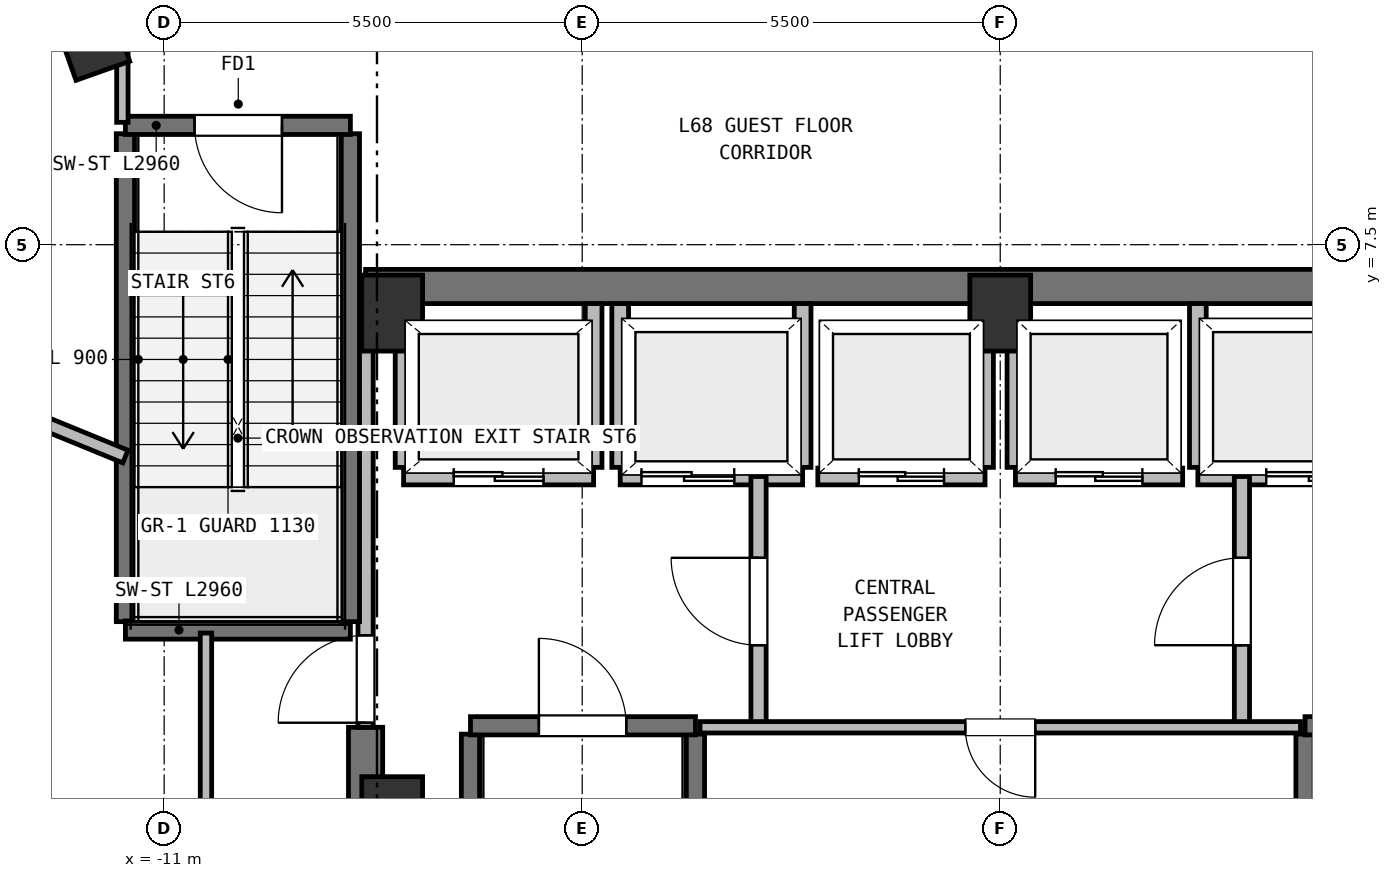
"""IFC4 building model, lengths in metres.
Left out: names, types, materials, properties, quantities, classifications, styles, units other than length and angle.
Written with IfcOpenShell. Run it as: python <this file> out.ifc"""

import sys

from ifc_helpers import new_model, si_unit, direction, frame, frame_2d, origin, origin_2d, place, context, subcontext, project, spatial, rectangle, extrude, element, fill, save


model = new_model("IFC4")
c1 = context("Model", 3, precision=1e-05, world=origin(), true_north=direction((0.0, 1.0)))
c2 = subcontext(c1, "Body", "Model", "MODEL_VIEW")
j1 = project(units=[si_unit("LENGTHUNIT", "METRE"), si_unit("PLANEANGLEUNIT", "RADIAN")], contexts=[c1])
p1 = place(None, origin())
s1 = spatial("IfcSite", under=j1, at=p1, CompositionType="ELEMENT")
p2 = place(p1, origin())
s2 = spatial("IfcBuilding", under=s1, at=p2, CompositionType="ELEMENT")
p3 = place(p2, frame((0.0, 0.0, 272.8)))
s3 = spatial("IfcBuildingStorey", under=s2, at=p3, CompositionType="ELEMENT", Elevation=272.8)
for number, where, z_axis, x_axis in (
    (1, (0.0, 6.6, 0.0), (0.0, 0.0, 1.0), (1.0, 0.0, 0.0)),
    (2, (-8.0, 6.6, 0.0), (0.0, 0.0, 1.0), (1.0, 0.0, 0.0)),
    (3, (-8.0, 0.0, 0.0), (0.0, 0.0, 1.0), (1.0, 0.0, 0.0)),
):
    element("IfcColumn", number, at=place(p3, frame(where, z_axis=z_axis, x_axis=x_axis)), inside=s3, PredefinedType="COLUMN", context=c2, shape_type="SweptSolid", body=[
        extrude(rectangle(XDim=0.8, YDim=1.0, at=origin_2d()), origin(), (0.0, 0.0, 1.0), 4.4),
    ])
p4 = place(p3, frame((-8.35, 6.95, 0.0), z_axis=(0.0, 0.0, 1.0), x_axis=(1.0, 0.0, 0.0)))
e4 = element("IfcWall", 4, at=p4, inside=s3, PredefinedType="SHEAR", context=c2, shape_type="SweptSolid", body=[
    extrude(rectangle(XDim=16.7, YDim=0.45, at=frame_2d((8.35, 0.0))), origin(), (0.0, 0.0, 1.0), 4.15),
])
p5 = place(p3, frame((-8.35, -6.95, 0.0), z_axis=(0.0, 0.0, 1.0), x_axis=(0.0, 1.0, 0.0)))
e5 = element("IfcWall", 5, at=p5, inside=s3, PredefinedType="SHEAR", context=c2, shape_type="SweptSolid", body=[
    extrude(rectangle(XDim=8.1, YDim=0.45, at=frame_2d((4.05, 0.0))), origin(), (0.0, 0.0, 1.0), 4.15),
])
p6 = place(p3, frame((-11.957, 10.212, 0.0), z_axis=(0.0, 0.0, 1.0), x_axis=(0.942641491092, 0.333806859234, 0.0)))
e6 = element("IfcColumn", 6, at=p6, inside=s3, PredefinedType="COLUMN", context=c2, shape_type="SweptSolid", body=[
    extrude(rectangle(XDim=0.75, YDim=0.9, at=origin_2d()), origin(), (0.0, 0.0, 1.0), 4.4),
])
p7 = place(p3, frame((-14.021, 9.694, 0.0), z_axis=(0.0, 0.0, 1.0), x_axis=(0.873970841772, 0.485978361383, 0.0)))
e7 = element("IfcWall", 7, at=p7, inside=s3, PredefinedType="SOLIDWALL", context=c2, shape_type="SweptSolid", body=[
    extrude(rectangle(XDim=2.472, YDim=0.33, at=frame_2d((1.236, 0.0))), origin(), (0.0, 0.0, 1.0), 4.15),
])
for number, where, z_axis, x_axis in (
    (8, (-6.97, -6.16, 0.0), (0.0, 0.0, 1.0), (0.0, 1.0, 0.0)),
    (9, (-4.01, -6.16, 0.0), (0.0, 0.0, 1.0), (0.0, 1.0, 0.0)),
):
    element("IfcWall", number, at=place(p3, frame(where, z_axis=z_axis, x_axis=x_axis)), inside=s3, PredefinedType="SHEAR", context=c2, shape_type="SweptSolid", body=[
        extrude(rectangle(XDim=7.22, YDim=0.24, at=frame_2d((3.61, 0.0))), origin(), (0.0, 0.0, 1.0), 4.15),
    ])
p8 = place(p3, frame((-6.97, 1.17, 0.0), z_axis=(0.0, 0.0, 1.0), x_axis=(1.0, 0.0, 0.0)))
e10 = element("IfcWall", 10, at=p8, inside=s3, PredefinedType="SHEAR", context=c2, shape_type="SweptSolid", body=[
    extrude(rectangle(XDim=2.96, YDim=0.24, at=frame_2d((1.48, 0.0))), origin(), (0.0, 0.0, 1.0), 4.15),
])
p9 = place(p8, frame((0.9, 0.0, 0.0)))
e11 = element("IfcOpeningElement", 11, at=p9, cuts=e10, PredefinedType="OPENING", context=c2, shape_type="SweptSolid", body=[
    extrude(rectangle(XDim=1.15, YDim=2.15, at=frame_2d((0.575, 1.075))), frame((0.0, 0.13, 0.0), z_axis=(0.0, -1.0, 0.0), x_axis=(1.0, 0.0, 0.0)), (0.0, 0.0, 1.0), 0.26),
])
p10 = place(p3, frame((4.01, -6.16, 0.0), z_axis=(0.0, 0.0, 1.0), x_axis=(0.0, 1.0, 0.0)))
e12 = element("IfcWall", 12, at=p10, inside=s3, PredefinedType="SHEAR", context=c2, shape_type="SweptSolid", body=[
    extrude(rectangle(XDim=7.22, YDim=0.24, at=frame_2d((3.61, 0.0))), origin(), (0.0, 0.0, 1.0), 4.15),
])
p11 = place(p3, frame((4.01, 1.17, 0.0), z_axis=(0.0, 0.0, 1.0), x_axis=(1.0, 0.0, 0.0)))
e13 = element("IfcWall", 13, at=p11, inside=s3, PredefinedType="SHEAR", context=c2, shape_type="SweptSolid", body=[
    extrude(rectangle(XDim=2.96, YDim=0.24, at=frame_2d((1.48, 0.0))), origin(), (0.0, 0.0, 1.0), 4.15),
])
p12 = place(p11, frame((0.9, 0.0, 0.0)))
e14 = element("IfcOpeningElement", 14, at=p12, cuts=e13, PredefinedType="OPENING", context=c2, shape_type="SweptSolid", body=[
    extrude(rectangle(XDim=1.15, YDim=2.15, at=frame_2d((0.575, 1.075))), frame((0.0, 0.13, 0.0), z_axis=(0.0, -1.0, 0.0), x_axis=(1.0, 0.0, 0.0)), (0.0, 0.0, 1.0), 0.26),
])
p13 = place(p3, frame((-7.85, 4.45, 0.0), z_axis=(0.0, 0.0, 1.0), x_axis=(1.0, 0.0, 0.0)))
e15 = element("IfcWall", 15, at=p13, inside=s3, PredefinedType="PARTITIONING", context=c2, shape_type="SweptSolid", body=[
    extrude(rectangle(XDim=2.5, YDim=0.22, at=frame_2d((1.25, 0.0))), origin(), (0.0, 0.0, 1.0), 4.15),
])
p14 = place(p13, frame((0.66, 0.0, 0.0)))
e16 = element("IfcOpeningElement", 16, at=p14, cuts=e15, PredefinedType="OPENING", context=c2, shape_type="SweptSolid", body=[
    extrude(rectangle(XDim=1.18, YDim=2.15, at=frame_2d((0.59, 1.075))), frame((0.0, 0.12, 0.0), z_axis=(0.0, -1.0, 0.0), x_axis=(1.0, 0.0, 0.0)), (0.0, 0.0, 1.0), 0.24),
])
p15 = place(p3, frame((-7.85, 4.57, 0.0), z_axis=(0.0, 0.0, 1.0), x_axis=(0.0, 1.0, 0.0)))
e17 = element("IfcWall", 17, at=p15, inside=s3, PredefinedType="PARTITIONING", context=c2, shape_type="SweptSolid", body=[
    extrude(rectangle(XDim=2.155, YDim=0.22, at=frame_2d((1.078, 0.0))), origin(), (0.0, 0.0, 1.0), 3.83),
])
p16 = place(p3, frame((-5.35, 4.57, 0.0), z_axis=(0.0, 0.0, 1.0), x_axis=(0.0, 1.0, 0.0)))
e18 = element("IfcWall", 18, at=p16, inside=s3, PredefinedType="PARTITIONING", context=c2, shape_type="SweptSolid", body=[
    extrude(rectangle(XDim=2.155, YDim=0.22, at=frame_2d((1.078, 0.0))), origin(), (0.0, 0.0, 1.0), 4.15),
])
p17 = place(p3, frame((-5.0, 4.45, 0.0), z_axis=(0.0, 0.0, 1.0), x_axis=(1.0, 0.0, 0.0)))
e19 = element("IfcWall", 19, at=p17, inside=s3, PredefinedType="PARTITIONING", context=c2, shape_type="SweptSolid", body=[
    extrude(rectangle(XDim=2.4, YDim=0.22, at=frame_2d((1.2, 0.0))), origin(), (0.0, 0.0, 1.0), 4.15),
])
p18 = place(p17, frame((0.28, 0.0, 0.0)))
e20 = element("IfcOpeningElement", 20, at=p18, cuts=e19, PredefinedType="OPENING", context=c2, shape_type="SweptSolid", body=[
    extrude(rectangle(XDim=1.22, YDim=2.15, at=frame_2d((0.61, 1.075))), frame((0.0, 0.12, 0.0), z_axis=(0.0, -1.0, 0.0), x_axis=(1.0, 0.0, 0.0)), (0.0, 0.0, 1.0), 0.24),
])
for number, where, z_axis, x_axis in (
    (21, (-5.0, 4.57, 0.0), (0.0, 0.0, 1.0), (0.0, 1.0, 0.0)),
    (22, (-2.6, 4.57, 0.0), (0.0, 0.0, 1.0), (0.0, 1.0, 0.0)),
):
    element("IfcWall", number, at=place(p3, frame(where, z_axis=z_axis, x_axis=x_axis)), inside=s3, PredefinedType="PARTITIONING", context=c2, shape_type="SweptSolid", body=[
        extrude(rectangle(XDim=2.155, YDim=0.22, at=frame_2d((1.078, 0.0))), origin(), (0.0, 0.0, 1.0), 4.15),
    ])
p19 = place(p3, frame((2.6, 4.45, 0.0), z_axis=(0.0, 0.0, 1.0), x_axis=(1.0, 0.0, 0.0)))
e23 = element("IfcWall", 23, at=p19, inside=s3, PredefinedType="PARTITIONING", context=c2, shape_type="SweptSolid", body=[
    extrude(rectangle(XDim=2.4, YDim=0.22, at=frame_2d((1.2, 0.0))), origin(), (0.0, 0.0, 1.0), 4.15),
])
p20 = place(p19, frame((0.9, 0.0, 0.0)))
e24 = element("IfcOpeningElement", 24, at=p20, cuts=e23, PredefinedType="OPENING", context=c2, shape_type="SweptSolid", body=[
    extrude(rectangle(XDim=1.22, YDim=2.15, at=frame_2d((0.61, 1.075))), frame((0.0, 0.12, 0.0), z_axis=(0.0, -1.0, 0.0), x_axis=(1.0, 0.0, 0.0)), (0.0, 0.0, 1.0), 0.24),
])
p21 = place(p3, frame((2.6, 4.57, 0.0), z_axis=(0.0, 0.0, 1.0), x_axis=(0.0, 1.0, 0.0)))
e25 = element("IfcWall", 25, at=p21, inside=s3, PredefinedType="PARTITIONING", context=c2, shape_type="SweptSolid", body=[
    extrude(rectangle(XDim=2.155, YDim=0.22, at=frame_2d((1.078, 0.0))), origin(), (0.0, 0.0, 1.0), 4.15),
])
p22 = place(p3, frame((-2.4, 4.45, 0.0), z_axis=(0.0, 0.0, 1.0), x_axis=(1.0, 0.0, 0.0)))
e26 = element("IfcWall", 26, at=p22, inside=s3, PredefinedType="PARTITIONING", context=c2, shape_type="SweptSolid", body=[
    extrude(rectangle(XDim=2.2, YDim=0.22, at=frame_2d((1.1, 0.0))), origin(), (0.0, 0.0, 1.0), 4.15),
])
p23 = place(p22, frame((0.54, 0.0, 0.0)))
e27 = element("IfcOpeningElement", 27, at=p23, cuts=e26, PredefinedType="OPENING", context=c2, shape_type="SweptSolid", body=[
    extrude(rectangle(XDim=1.12, YDim=2.15, at=frame_2d((0.56, 1.075))), frame((0.0, 0.12, 0.0), z_axis=(0.0, -1.0, 0.0), x_axis=(1.0, 0.0, 0.0)), (0.0, 0.0, 1.0), 0.24),
])
p24 = place(p3, frame((-0.2, 4.57, 0.0), z_axis=(0.0, 0.0, 1.0), x_axis=(0.0, 1.0, 0.0)))
e28 = element("IfcWall", 28, at=p24, inside=s3, PredefinedType="PARTITIONING", context=c2, shape_type="SweptSolid", body=[
    extrude(rectangle(XDim=2.155, YDim=0.22, at=frame_2d((1.078, 0.0))), origin(), (0.0, 0.0, 1.0), 4.15),
])
p25 = place(p3, frame((0.2, 4.45, 0.0), z_axis=(0.0, 0.0, 1.0), x_axis=(1.0, 0.0, 0.0)))
e29 = element("IfcWall", 29, at=p25, inside=s3, PredefinedType="PARTITIONING", context=c2, shape_type="SweptSolid", body=[
    extrude(rectangle(XDim=2.2, YDim=0.22, at=frame_2d((1.1, 0.0))), origin(), (0.0, 0.0, 1.0), 4.15),
])
p26 = place(p25, frame((0.53, 0.0, 0.0)))
e30 = element("IfcOpeningElement", 30, at=p26, cuts=e29, PredefinedType="OPENING", context=c2, shape_type="SweptSolid", body=[
    extrude(rectangle(XDim=1.14, YDim=2.15, at=frame_2d((0.57, 1.075))), frame((0.0, 0.12, 0.0), z_axis=(0.0, -1.0, 0.0), x_axis=(1.0, 0.0, 0.0)), (0.0, 0.0, 1.0), 0.24),
])
p27 = place(p3, frame((0.2, 4.57, 0.0), z_axis=(0.0, 0.0, 1.0), x_axis=(0.0, 1.0, 0.0)))
e31 = element("IfcWall", 31, at=p27, inside=s3, PredefinedType="PARTITIONING", context=c2, shape_type="SweptSolid", body=[
    extrude(rectangle(XDim=2.155, YDim=0.22, at=frame_2d((1.078, 0.0))), origin(), (0.0, 0.0, 1.0), 4.15),
])
p28 = place(p3, frame((-3.18, 1.15, 0.0), z_axis=(0.0, 0.0, 1.0), x_axis=(0.0, 1.0, 0.0)))
e32 = element("IfcWall", 32, at=p28, inside=s3, PredefinedType="PARTITIONING", context=c2, shape_type="SweptSolid", body=[
    extrude(rectangle(XDim=3.3, YDim=0.2, at=frame_2d((1.65, 0.0))), origin(), (0.0, 0.0, 1.0), 4.15),
])
p29 = place(p28, frame((1.08, 0.0, 0.0)))
e33 = element("IfcOpeningElement", 33, at=p29, cuts=e32, PredefinedType="OPENING", context=c2, shape_type="SweptSolid", body=[
    extrude(rectangle(XDim=1.15, YDim=2.15, at=frame_2d((0.575, 1.075))), frame((0.0, 0.11, 0.0), z_axis=(0.0, -1.0, 0.0), x_axis=(1.0, 0.0, 0.0)), (0.0, 0.0, 1.0), 0.22),
])
p30 = place(p3, frame((3.18, 1.15, 0.0), z_axis=(0.0, 0.0, 1.0), x_axis=(0.0, 1.0, 0.0)))
e34 = element("IfcWall", 34, at=p30, inside=s3, PredefinedType="PARTITIONING", context=c2, shape_type="SweptSolid", body=[
    extrude(rectangle(XDim=3.3, YDim=0.2, at=frame_2d((1.65, 0.0))), origin(), (0.0, 0.0, 1.0), 4.15),
])
p31 = place(p30, frame((1.08, 0.0, 0.0)))
e35 = element("IfcOpeningElement", 35, at=p31, cuts=e34, PredefinedType="OPENING", context=c2, shape_type="SweptSolid", body=[
    extrude(rectangle(XDim=1.15, YDim=2.15, at=frame_2d((0.575, 1.075))), frame((0.0, 0.11, 0.0), z_axis=(0.0, -1.0, 0.0), x_axis=(1.0, 0.0, 0.0)), (0.0, 0.0, 1.0), 0.22),
])
p32 = place(p3, frame((-8.35, 1.15, 0.0), z_axis=(0.0, 0.0, 1.0), x_axis=(0.0, 1.0, 0.0)))
e36 = element("IfcWall", 36, at=p32, inside=s3, PredefinedType="PARTITIONING", context=c2, shape_type="SweptSolid", body=[
    extrude(rectangle(XDim=5.4, YDim=0.2, at=frame_2d((2.7, 0.0))), origin(), (0.0, 0.0, 1.0), 4.15),
])
p33 = place(p32, frame((0.06, 0.0, 0.0)))
e37 = element("IfcOpeningElement", 37, at=p33, cuts=e36, PredefinedType="OPENING", context=c2, shape_type="SweptSolid", body=[
    extrude(rectangle(XDim=1.15, YDim=2.15, at=frame_2d((0.575, 1.075))), frame((0.0, 0.11, 0.0), z_axis=(0.0, -1.0, 0.0), x_axis=(1.0, 0.0, 0.0)), (0.0, 0.0, 1.0), 0.22),
])
p34 = place(p3, frame((3.95, 1.15, 0.0), z_axis=(0.0, 0.0, 1.0), x_axis=(-1.0, 0.0, 0.0)))
e38 = element("IfcWall", 38, at=p34, inside=s3, PredefinedType="PARTITIONING", context=c2, shape_type="SweptSolid", body=[
    extrude(rectangle(XDim=7.9, YDim=0.15, at=frame_2d((3.95, 0.0))), origin(), (0.0, 0.0, 1.0), 4.15),
])
p35 = place(p34, frame((3.49, 0.0, 0.0)))
e39 = element("IfcOpeningElement", 39, at=p35, cuts=e38, PredefinedType="OPENING", context=c2, shape_type="SweptSolid", body=[
    extrude(rectangle(XDim=0.92, YDim=2.05, at=frame_2d((0.46, 1.025))), frame((0.0, 0.085, 0.0), z_axis=(0.0, -1.0, 0.0), x_axis=(1.0, 0.0, 0.0)), (0.0, 0.0, 1.0), 0.17),
])
p36 = place(p3, frame((-11.51, 2.54, 0.0), z_axis=(0.0, 0.0, 1.0), x_axis=(0.0, 1.0, 0.0)))
e40 = element("IfcWall", 40, at=p36, inside=s3, PredefinedType="SHEAR", context=c2, shape_type="SweptSolid", body=[
    extrude(rectangle(XDim=6.42, YDim=0.24, at=frame_2d((3.21, 0.0))), origin(), (0.0, 0.0, 1.0), 4.15),
])
p37 = place(p3, frame((-11.51, 2.43, 0.0), z_axis=(0.0, 0.0, 1.0), x_axis=(1.0, 0.0, 0.0)))
e41 = element("IfcWall", 41, at=p37, inside=s3, PredefinedType="SHEAR", context=c2, shape_type="SweptSolid", body=[
    extrude(rectangle(XDim=2.96, YDim=0.24, at=frame_2d((1.48, 0.0))), origin(), (0.0, 0.0, 1.0), 4.15),
])
p38 = place(p3, frame((-8.55, 2.54, 0.0), z_axis=(0.0, 0.0, 1.0), x_axis=(0.0, 1.0, 0.0)))
e42 = element("IfcWall", 42, at=p38, inside=s3, PredefinedType="SHEAR", context=c2, shape_type="SweptSolid", body=[
    extrude(rectangle(XDim=6.42, YDim=0.24, at=frame_2d((3.21, 0.0))), origin(), (0.0, 0.0, 1.0), 4.15),
])
p39 = place(p3, frame((-8.55, 9.07, 0.0), z_axis=(0.0, 0.0, 1.0), x_axis=(-1.0, 0.0, 0.0)))
e43 = element("IfcWall", 43, at=p39, inside=s3, PredefinedType="SHEAR", context=c2, shape_type="SweptSolid", body=[
    extrude(rectangle(XDim=2.96, YDim=0.24, at=frame_2d((1.48, 0.0))), origin(), (0.0, 0.0, 1.0), 4.15),
])
p40 = place(p39, frame((0.9, 0.0, 0.0)))
e44 = element("IfcOpeningElement", 44, at=p40, cuts=e43, PredefinedType="OPENING", context=c2, shape_type="SweptSolid", body=[
    extrude(rectangle(XDim=1.15, YDim=2.15, at=frame_2d((0.575, 1.075))), frame((0.0, 0.13, 0.0), z_axis=(0.0, -1.0, 0.0), x_axis=(1.0, 0.0, 0.0)), (0.0, 0.0, 1.0), 0.26),
])
p41 = place(p3, frame((-11.55, 9.11, 0.0), z_axis=(0.0, 0.0, 1.0), x_axis=(0.0, 1.0, 0.0)))
e45 = element("IfcWall", 45, at=p41, inside=s3, PredefinedType="PARTITIONING", context=c2, shape_type="SweptSolid", body=[
    extrude(rectangle(XDim=1.37, YDim=0.15, at=frame_2d((0.685, 0.0))), origin(), (0.0, 0.0, 1.0), 4.15),
])
p42 = place(p3, frame((-10.45, -7.24, 0.0), z_axis=(0.0, 0.0, 1.0), x_axis=(0.0, 1.0, 0.0)))
e46 = element("IfcWall", 46, at=p42, inside=s3, PredefinedType="PARTITIONING", context=c2, shape_type="SweptSolid", body=[
    extrude(rectangle(XDim=9.63, YDim=0.15, at=frame_2d((4.815, 0.0))), origin(), (0.0, 0.0, 1.0), 4.15),
])
p43 = place(p42, frame((4.355, 0.0, 0.0)))
e47 = element("IfcOpeningElement", 47, at=p43, cuts=e46, PredefinedType="OPENING", context=c2, shape_type="SweptSolid", body=[
    extrude(rectangle(XDim=1.0, YDim=2.15, at=frame_2d((0.5, 1.075))), frame((0.0, 0.085, 0.0), z_axis=(0.0, -1.0, 0.0), x_axis=(1.0, 0.0, 0.0)), (0.0, 0.0, 1.0), 0.17),
])
p44 = place(p3, frame((-11.51, 4.712, 0.0), z_axis=(0.0, 0.0, 1.0), x_axis=(-0.925422915291, 0.378935915234, 0.0)))
e48 = element("IfcWall", 48, at=p44, inside=s3, PredefinedType="PARTITIONING", context=c2, shape_type="SweptSolid", body=[
    extrude(rectangle(XDim=6.806, YDim=0.18, at=frame_2d((3.403, 0.0))), origin(), (0.0, 0.0, 1.0), 4.15),
])
p45 = place(p9, origin())
e49 = element("IfcDoor", 49, at=p45, inside=s3, OperationType="SINGLE_SWING_LEFT", PredefinedType="DOOR", context=c2, shape_type="SweptSolid", body=[
    extrude(rectangle(XDim=1.15, YDim=2.15, at=frame_2d((0.575, 1.075))), frame((0.0, 0.025, 0.0), z_axis=(0.0, -1.0, 0.0), x_axis=(1.0, 0.0, 0.0)), (0.0, 0.0, 1.0), 0.05),
])
fill(e11, e49)
p46 = place(p14, origin())
e50 = element("IfcDoor", 50, at=p46, inside=s3, OperationType="DOUBLE_DOOR_SLIDING", PredefinedType="DOOR", context=c2, shape_type="SweptSolid", body=[
    extrude(rectangle(XDim=1.18, YDim=2.15, at=frame_2d((0.59, 1.075))), frame((0.0, 0.025, 0.0), z_axis=(0.0, -1.0, 0.0), x_axis=(1.0, 0.0, 0.0)), (0.0, 0.0, 1.0), 0.05),
])
fill(e16, e50)
p47 = place(p18, origin())
e51 = element("IfcDoor", 51, at=p47, inside=s3, OperationType="DOUBLE_DOOR_SLIDING", PredefinedType="DOOR", context=c2, shape_type="SweptSolid", body=[
    extrude(rectangle(XDim=1.22, YDim=2.15, at=frame_2d((0.61, 1.075))), frame((0.0, 0.025, 0.0), z_axis=(0.0, -1.0, 0.0), x_axis=(1.0, 0.0, 0.0)), (0.0, 0.0, 1.0), 0.05),
])
fill(e20, e51)
p48 = place(p20, origin())
e52 = element("IfcDoor", 52, at=p48, inside=s3, OperationType="DOUBLE_DOOR_SLIDING", PredefinedType="DOOR", context=c2, shape_type="SweptSolid", body=[
    extrude(rectangle(XDim=1.22, YDim=2.15, at=frame_2d((0.61, 1.075))), frame((0.0, 0.025, 0.0), z_axis=(0.0, -1.0, 0.0), x_axis=(1.0, 0.0, 0.0)), (0.0, 0.0, 1.0), 0.05),
])
fill(e24, e52)
p49 = place(p23, origin())
e53 = element("IfcDoor", 53, at=p49, inside=s3, OperationType="DOUBLE_DOOR_SLIDING", PredefinedType="DOOR", context=c2, shape_type="SweptSolid", body=[
    extrude(rectangle(XDim=1.12, YDim=2.15, at=frame_2d((0.56, 1.075))), frame((0.0, 0.025, 0.0), z_axis=(0.0, -1.0, 0.0), x_axis=(1.0, 0.0, 0.0)), (0.0, 0.0, 1.0), 0.05),
])
fill(e27, e53)
p50 = place(p26, origin())
e54 = element("IfcDoor", 54, at=p50, inside=s3, OperationType="DOUBLE_DOOR_SLIDING", PredefinedType="DOOR", context=c2, shape_type="SweptSolid", body=[
    extrude(rectangle(XDim=1.14, YDim=2.15, at=frame_2d((0.57, 1.075))), frame((0.0, 0.025, 0.0), z_axis=(0.0, -1.0, 0.0), x_axis=(1.0, 0.0, 0.0)), (0.0, 0.0, 1.0), 0.05),
])
fill(e30, e54)
p51 = place(p29, origin())
e55 = element("IfcDoor", 55, at=p51, inside=s3, OperationType="SINGLE_SWING_RIGHT", PredefinedType="DOOR", context=c2, shape_type="SweptSolid", body=[
    extrude(rectangle(XDim=1.15, YDim=2.15, at=frame_2d((0.575, 1.075))), frame((0.0, 0.025, 0.0), z_axis=(0.0, -1.0, 0.0), x_axis=(1.0, 0.0, 0.0)), (0.0, 0.0, 1.0), 0.05),
])
fill(e33, e55)
p52 = place(p31, origin())
e56 = element("IfcDoor", 56, at=p52, inside=s3, OperationType="SINGLE_SWING_LEFT", PredefinedType="DOOR", context=c2, shape_type="SweptSolid", body=[
    extrude(rectangle(XDim=1.15, YDim=2.15, at=frame_2d((0.575, 1.075))), frame((0.0, 0.025, 0.0), z_axis=(0.0, -1.0, 0.0), x_axis=(1.0, 0.0, 0.0)), (0.0, 0.0, 1.0), 0.05),
])
fill(e35, e56)
p53 = place(p33, origin())
e57 = element("IfcDoor", 57, at=p53, inside=s3, OperationType="SINGLE_SWING_LEFT", PredefinedType="DOOR", context=c2, shape_type="SweptSolid", body=[
    extrude(rectangle(XDim=1.15, YDim=2.15, at=frame_2d((0.575, 1.075))), frame((0.0, 0.025, 0.0), z_axis=(0.0, -1.0, 0.0), x_axis=(1.0, 0.0, 0.0)), (0.0, 0.0, 1.0), 0.05),
])
fill(e37, e57)
p54 = place(p35, origin())
e58 = element("IfcDoor", 58, at=p54, inside=s3, OperationType="SINGLE_SWING_LEFT", PredefinedType="DOOR", context=c2, shape_type="SweptSolid", body=[
    extrude(rectangle(XDim=0.92, YDim=2.05, at=frame_2d((0.46, 1.025))), frame((0.0, 0.025, 0.0), z_axis=(0.0, -1.0, 0.0), x_axis=(1.0, 0.0, 0.0)), (0.0, 0.0, 1.0), 0.05),
])
fill(e39, e58)
p55 = place(p40, origin())
e59 = element("IfcDoor", 59, at=p55, inside=s3, OperationType="SINGLE_SWING_LEFT", PredefinedType="DOOR", context=c2, shape_type="SweptSolid", body=[
    extrude(rectangle(XDim=1.15, YDim=2.15, at=frame_2d((0.575, 1.075))), frame((0.0, 0.025, 0.0), z_axis=(0.0, -1.0, 0.0), x_axis=(1.0, 0.0, 0.0)), (0.0, 0.0, 1.0), 0.05),
])
fill(e44, e59)
save(model, sys.argv[1])
